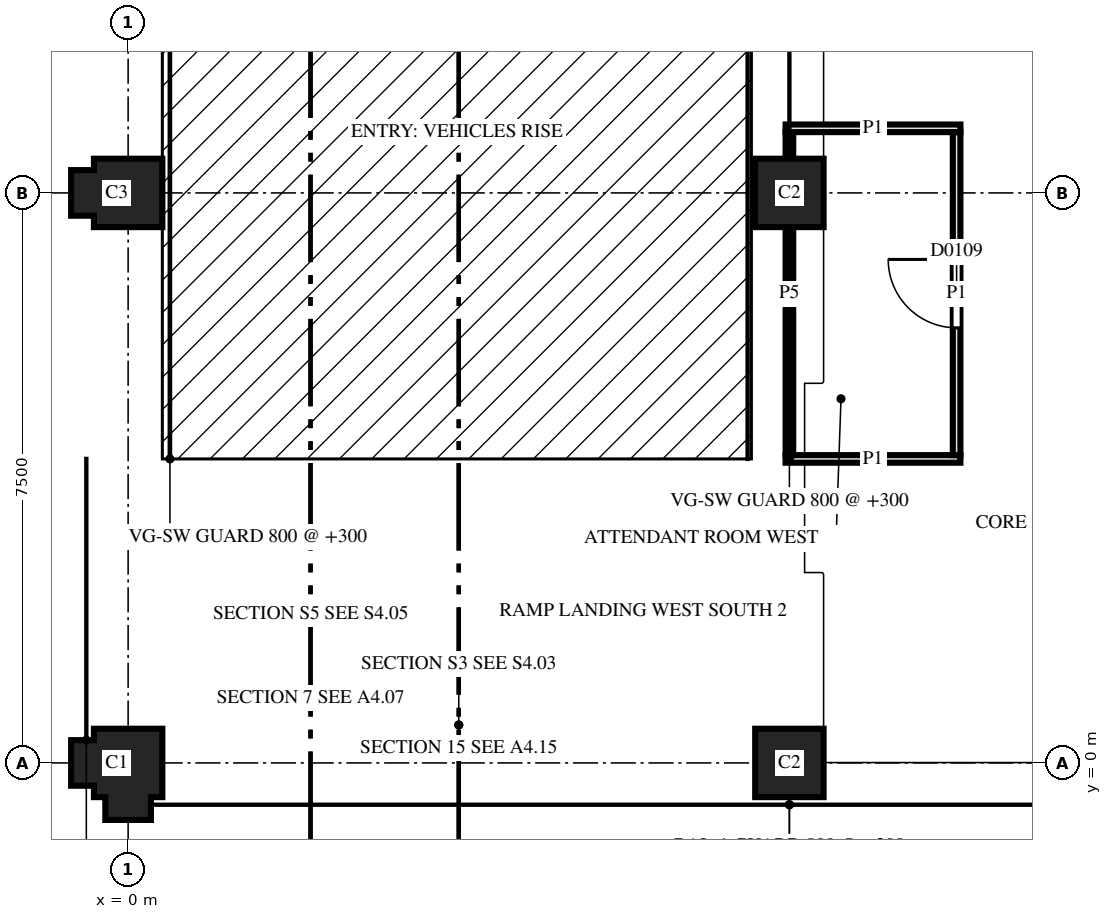
"""IFC4 building model, lengths in metres.
Left out: names, types, materials, properties, quantities, classifications, styles, units other than length and angle.
Written with IfcOpenShell. Run it as: python <this file> out.ifc"""

import sys

from ifc_helpers import new_model, si_unit, direction, frame, frame_2d, origin, place, context, subcontext, project, spatial, polyline, rectangle, outline, extrude, element, fill, save


model = new_model("IFC4")
c1 = context("Model", 3, precision=1e-05, world=origin(), true_north=direction((0.0, 1.0)))
c2 = subcontext(c1, "Body", "Model", "MODEL_VIEW")
j1 = project(units=[si_unit("LENGTHUNIT", "METRE"), si_unit("PLANEANGLEUNIT", "RADIAN")], contexts=[c1])
p1 = place(None, origin())
s1 = spatial("IfcSite", under=j1, at=p1, CompositionType="ELEMENT")
p2 = place(p1, origin())
s2 = spatial("IfcBuilding", under=s1, at=p2, CompositionType="ELEMENT")
p3 = place(p2, frame((0.0, 0.0, 4.5)))
s3 = spatial("IfcBuildingStorey", under=s2, at=p3, CompositionType="ELEMENT", Elevation=4.5)
p4 = place(p3, frame((0.0, 0.0, 0.0), z_axis=(0.0, 0.0, 1.0), x_axis=(-1.0, 0.0, 0.0)))
e1 = element("IfcColumn", 1, at=p4, inside=s3, PredefinedType="COLUMN", context=c2, shape_type="SweptSolid", body=[
    extrude(outline(polyline([(-0.45, -0.45), (0.45, -0.45), (0.45, -0.3), (0.75, -0.3), (0.75, 0.3), (0.45, 0.3), (0.45, 0.45), (0.3, 0.45), (0.3, 0.75), (-0.3, 0.75), (-0.3, 0.45), (-0.45, 0.45), (-0.45, -0.45)])), origin(), (0.0, 0.0, 1.0), 3.7),
])
p5 = place(p3, frame((8.7, 0.0, 0.0), z_axis=(0.0, 0.0, 1.0), x_axis=(1.0, 0.0, 0.0)))
e2 = element("IfcColumn", 2, at=p5, inside=s3, PredefinedType="COLUMN", context=c2, shape_type="SweptSolid", body=[
    extrude(outline(polyline([(-0.45, -0.45), (0.45, -0.45), (0.45, 0.45), (-0.45, 0.45), (-0.45, -0.45)])), origin(), (0.0, 0.0, 1.0), 3.7),
])
p6 = place(p3, frame((0.0, 7.5, 0.0), z_axis=(0.0, 0.0, 1.0), x_axis=(-1.0, 0.0, 0.0)))
e3 = element("IfcColumn", 3, at=p6, inside=s3, PredefinedType="COLUMN", context=c2, shape_type="SweptSolid", body=[
    extrude(outline(polyline([(-0.45, -0.45), (0.45, -0.45), (0.45, -0.3), (0.75, -0.3), (0.75, 0.3), (0.45, 0.3), (0.45, 0.45), (-0.45, 0.45), (-0.45, -0.45)])), origin(), (0.0, 0.0, 1.0), 3.7),
])
p7 = place(p3, frame((8.7, 7.5, 0.0), z_axis=(0.0, 0.0, 1.0), x_axis=(1.0, 0.0, 0.0)))
e4 = element("IfcColumn", 4, at=p7, inside=s3, PredefinedType="COLUMN", context=c2, shape_type="SweptSolid", body=[
    extrude(outline(polyline([(-0.45, -0.45), (0.45, -0.45), (0.45, 0.45), (-0.45, 0.45), (-0.45, -0.45)])), origin(), (0.0, 0.0, 1.0), 3.7),
])
p8 = place(p3, frame((8.65, 4.0, 0.0), z_axis=(0.0, 0.0, 1.0), x_axis=(1.0, 0.0, 0.0)))
e5 = element("IfcWall", 5, at=p8, inside=s3, PredefinedType="PARTITIONING", context=c2, shape_type="SweptSolid", body=[
    extrude(rectangle(XDim=2.3, YDim=0.1, at=frame_2d((1.15, 0.0))), origin(), (0.0, 0.0, 1.0), 2.88),
])
p9 = place(p3, frame((10.9, 4.05, 0.0), z_axis=(0.0, 0.0, 1.0), x_axis=(0.0, 1.0, 0.0)))
e6 = element("IfcWall", 6, at=p9, inside=s3, PredefinedType="PARTITIONING", context=c2, shape_type="SweptSolid", body=[
    extrude(rectangle(XDim=4.25, YDim=0.1, at=frame_2d((2.125, 0.0))), origin(), (0.0, 0.0, 1.0), 2.88),
])
p10 = place(p9, frame((1.675, 0.0, 0.0)))
e7 = element("IfcOpeningElement", 7, at=p10, cuts=e6, PredefinedType="OPENING", context=c2, shape_type="SweptSolid", body=[
    extrude(rectangle(XDim=0.9, YDim=2.1, at=frame_2d((0.45, 1.05))), frame((0.0, 0.06, 0.0), z_axis=(0.0, -1.0, 0.0), x_axis=(1.0, 0.0, 0.0)), (0.0, 0.0, 1.0), 0.12),
])
p11 = place(p3, frame((8.7, 8.3, 0.0), z_axis=(0.0, 0.0, 1.0), x_axis=(0.0, -1.0, 0.0)))
e8 = element("IfcWall", 8, at=p11, inside=s3, PredefinedType="PARTITIONING", context=c2, shape_type="SweptSolid", body=[
    extrude(rectangle(XDim=4.25, YDim=0.1, at=frame_2d((2.125, 0.0))), origin(), (0.0, 0.0, 1.0), 2.6),
])
p12 = place(p3, frame((10.95, 8.35, 0.0), z_axis=(0.0, 0.0, 1.0), x_axis=(-1.0, 0.0, 0.0)))
e9 = element("IfcWall", 9, at=p12, inside=s3, PredefinedType="PARTITIONING", context=c2, shape_type="SweptSolid", body=[
    extrude(rectangle(XDim=2.3, YDim=0.1, at=frame_2d((1.15, 0.0))), origin(), (0.0, 0.0, 1.0), 2.88),
])
p13 = place(p10, origin())
e10 = element("IfcDoor", 10, at=p13, inside=s3, OperationType="SINGLE_SWING_LEFT", PredefinedType="DOOR", context=c2, shape_type="SweptSolid", body=[
    extrude(rectangle(XDim=0.9, YDim=2.1, at=frame_2d((0.45, 1.05))), frame((0.0, 0.025, 0.0), z_axis=(0.0, -1.0, 0.0), x_axis=(1.0, 0.0, 0.0)), (0.0, 0.0, 1.0), 0.05),
])
fill(e7, e10)
save(model, sys.argv[1])
